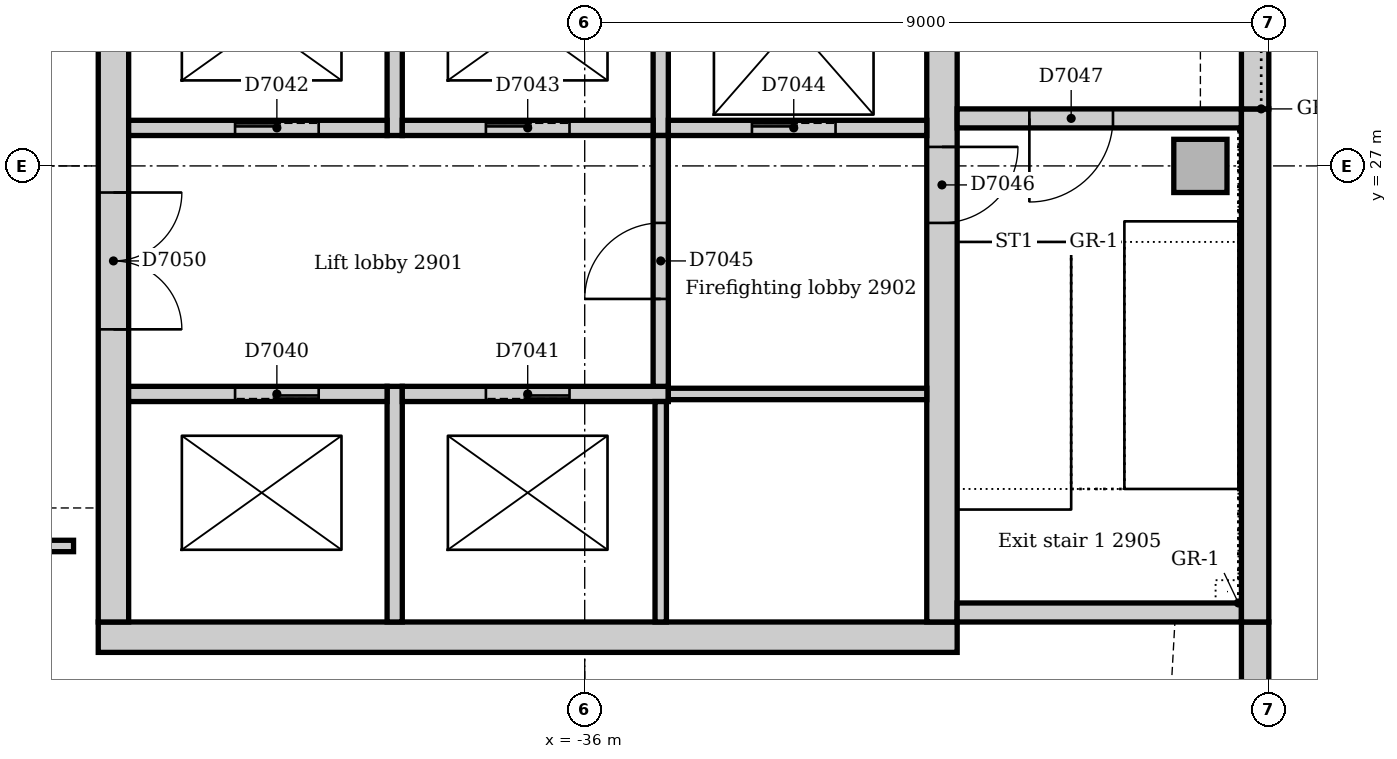
"""IFC4 building model, lengths in metres.
Left out: names, types, materials, properties, quantities, classifications, styles, units other than length and angle.
Written with IfcOpenShell. Run it as: python <this file> out.ifc"""

import sys

from ifc_helpers import new_model, si_unit, direction, frame, frame_2d, origin, origin_2d, place, context, subcontext, project, spatial, rectangle, extrude, element, fill, save


model = new_model("IFC4")
c1 = context("Model", 3, precision=1e-05, world=origin(), true_north=direction((0.0, 1.0)))
c2 = subcontext(c1, "Body", "Model", "MODEL_VIEW")
j1 = project(units=[si_unit("LENGTHUNIT", "METRE"), si_unit("PLANEANGLEUNIT", "RADIAN")], contexts=[c1])
p1 = place(None, origin())
s1 = spatial("IfcSite", under=j1, at=p1, CompositionType="ELEMENT")
p2 = place(p1, origin())
s2 = spatial("IfcBuilding", under=s1, at=p2, CompositionType="ELEMENT")
p3 = place(p2, frame((0.0, 0.0, 124.0)))
s3 = spatial("IfcBuildingStorey", under=s2, at=p3, CompositionType="ELEMENT", Elevation=124.0)
p4 = place(p3, frame((-42.4, 20.8, 0.0), z_axis=(0.0, 0.0, 1.0), x_axis=(1.0, 0.0, 0.0)))
e1 = element("IfcWall", 1, at=p4, inside=s3, PredefinedType="SOLIDWALL", context=c2, shape_type="SweptSolid", body=[
    extrude(rectangle(XDim=11.3, YDim=0.4, at=frame_2d((5.65, 0.0))), origin(), (0.0, 0.0, 1.0), 4.0),
])
p5 = place(p3, frame((-31.3, 21.0, 0.0), z_axis=(0.0, 0.0, 1.0), x_axis=(0.0, 1.0, 0.0)))
e2 = element("IfcWall", 2, at=p5, inside=s3, PredefinedType="SOLIDWALL", context=c2, shape_type="SweptSolid", body=[
    extrude(rectangle(XDim=9.5, YDim=0.4, at=frame_2d((4.75, 0.0))), origin(), (0.0, 0.0, 1.0), 4.0),
])
p6 = place(p5, frame((5.25, 0.0, 0.0)))
e3 = element("IfcOpeningElement", 3, at=p6, cuts=e2, PredefinedType="OPENING", context=c2, shape_type="SweptSolid", body=[
    extrude(rectangle(XDim=1.0, YDim=2.1, at=frame_2d((0.5, 1.05))), frame((0.0, 0.21, 0.0), z_axis=(0.0, -1.0, 0.0), x_axis=(1.0, 0.0, 0.0)), (0.0, 0.0, 1.0), 0.42),
])
p7 = place(p3, frame((-42.2, 30.5, 0.0), z_axis=(0.0, 0.0, 1.0), x_axis=(0.0, -1.0, 0.0)))
e4 = element("IfcWall", 4, at=p7, inside=s3, PredefinedType="SOLIDWALL", context=c2, shape_type="SweptSolid", body=[
    extrude(rectangle(XDim=9.5, YDim=0.4, at=frame_2d((4.75, 0.0))), origin(), (0.0, 0.0, 1.0), 4.0),
])
p8 = place(p7, frame((3.85, 0.0, 0.0)))
e5 = element("IfcOpeningElement", 5, at=p8, cuts=e4, PredefinedType="OPENING", context=c2, shape_type="SweptSolid", body=[
    extrude(rectangle(XDim=1.8, YDim=2.1, at=frame_2d((0.9, 1.05))), frame((0.0, 0.21, 0.0), z_axis=(0.0, -1.0, 0.0), x_axis=(1.0, 0.0, 0.0)), (0.0, 0.0, 1.0), 0.42),
])
p9 = place(p3, frame((-31.1, 21.125, 0.0), z_axis=(0.0, 0.0, 1.0), x_axis=(1.0, 0.0, 0.0)))
e6 = element("IfcWall", 6, at=p9, inside=s3, PredefinedType="SOLIDWALL", context=c2, shape_type="SweptSolid", body=[
    extrude(rectangle(XDim=3.74, YDim=0.25, at=frame_2d((1.87, 0.0))), origin(), (0.0, 0.0, 1.0), 4.0),
])
p10 = place(p3, frame((-27.36, 27.625, 0.0), z_axis=(0.0, 0.0, 1.0), x_axis=(-1.0, 0.0, 0.0)))
e7 = element("IfcWall", 7, at=p10, inside=s3, PredefinedType="SOLIDWALL", context=c2, shape_type="SweptSolid", body=[
    extrude(rectangle(XDim=3.74, YDim=0.25, at=frame_2d((1.87, 0.0))), origin(), (0.0, 0.0, 1.0), 4.0),
])
p11 = place(p10, frame((1.69, 0.0, 0.0)))
e8 = element("IfcOpeningElement", 8, at=p11, cuts=e7, PredefinedType="OPENING", context=c2, shape_type="SweptSolid", body=[
    extrude(rectangle(XDim=1.1, YDim=2.1, at=frame_2d((0.55, 1.05))), frame((0.0, 0.135, 0.0), z_axis=(0.0, -1.0, 0.0), x_axis=(1.0, 0.0, 0.0)), (0.0, 0.0, 1.0), 0.27),
])
p12 = place(p3, frame((-27.9, 27.0, 0.0), z_axis=(0.0, 0.0, 1.0), x_axis=(1.0, 0.0, 0.0)))
e9 = element("IfcColumn", 9, at=p12, inside=s3, PredefinedType="COLUMN", context=c2, shape_type="SweptSolid", body=[
    extrude(rectangle(XDim=0.7, YDim=0.7, at=origin_2d()), origin(), (0.0, 0.0, 1.0), 4.0),
])
p13 = place(p3, frame((-27.18, 17.743, 0.0), z_axis=(0.0, 0.0, 1.0), x_axis=(0.0, 1.0, 0.0)))
e10 = element("IfcWall", 10, at=p13, inside=s3, PredefinedType="STANDARD", context=c2, shape_type="SweptSolid", body=[
    extrude(rectangle(XDim=3.257, YDim=0.36, at=frame_2d((1.629, 0.0))), origin(), (0.0, 0.0, 1.0), 3.85),
])
p14 = place(p3, frame((-27.18, 21.0, 0.0), z_axis=(0.0, 0.0, 1.0), x_axis=(0.0, 1.0, 0.0)))
e11 = element("IfcWall", 11, at=p14, inside=s3, PredefinedType="STANDARD", context=c2, shape_type="SweptSolid", body=[
    extrude(rectangle(XDim=6.75, YDim=0.36, at=frame_2d((3.375, 0.0))), origin(), (0.0, 0.0, 1.0), 3.85),
])
p15 = place(p3, frame((-27.18, 27.75, 0.0), z_axis=(0.0, 0.0, 1.0), x_axis=(0.0, 1.0, 0.0)))
e12 = element("IfcWall", 12, at=p15, inside=s3, PredefinedType="STANDARD", context=c2, shape_type="SweptSolid", body=[
    extrude(rectangle(XDim=7.5, YDim=0.36, at=frame_2d((3.75, 0.0))), origin(), (0.0, 0.0, 1.0), 3.85),
])
p16 = place(p15, frame((2.85, 0.0, 1.2)))
e13 = element("IfcOpeningElement", 13, at=p16, cuts=e12, PredefinedType="OPENING", context=c2, shape_type="SweptSolid", body=[
    extrude(rectangle(XDim=1.8, YDim=1.2, at=frame_2d((0.9, 0.6))), frame((0.0, 0.19, 0.0), z_axis=(0.0, -1.0, 0.0), x_axis=(1.0, 0.0, 0.0)), (0.0, 0.0, 1.0), 0.38),
])
p17 = place(p3, frame((-38.5, 21.0, 0.0), z_axis=(0.0, 0.0, 1.0), x_axis=(0.0, 1.0, 0.0)))
e14 = element("IfcWall", 14, at=p17, inside=s3, PredefinedType="SOLIDWALL", context=c2, shape_type="SweptSolid", body=[
    extrude(rectangle(XDim=3.1, YDim=0.2, at=frame_2d((1.55, 0.0))), origin(), (0.0, 0.0, 1.0), 4.0),
])
p18 = place(p3, frame((-38.6, 24.0, 0.0), z_axis=(0.0, 0.0, 1.0), x_axis=(-1.0, 0.0, 0.0)))
e15 = element("IfcWall", 15, at=p18, inside=s3, PredefinedType="SOLIDWALL", context=c2, shape_type="SweptSolid", body=[
    extrude(rectangle(XDim=3.4, YDim=0.2, at=frame_2d((1.7, 0.0))), origin(), (0.0, 0.0, 1.0), 4.0),
])
p19 = place(p18, frame((0.9, 0.0, 0.0)))
e16 = element("IfcOpeningElement", 16, at=p19, cuts=e15, PredefinedType="OPENING", context=c2, shape_type="SweptSolid", body=[
    extrude(rectangle(XDim=1.1, YDim=2.1, at=frame_2d((0.55, 1.05))), frame((0.0, 0.11, 0.0), z_axis=(0.0, -1.0, 0.0), x_axis=(1.0, 0.0, 0.0)), (0.0, 0.0, 1.0), 0.22),
])
p20 = place(p3, frame((-34.9, 24.0, 0.0), z_axis=(0.0, 0.0, 1.0), x_axis=(-1.0, 0.0, 0.0)))
e17 = element("IfcWall", 17, at=p20, inside=s3, PredefinedType="SOLIDWALL", context=c2, shape_type="SweptSolid", body=[
    extrude(rectangle(XDim=3.5, YDim=0.2, at=frame_2d((1.75, 0.0))), origin(), (0.0, 0.0, 1.0), 4.0),
])
p21 = place(p20, frame((1.3, 0.0, 0.0)))
e18 = element("IfcOpeningElement", 18, at=p21, cuts=e17, PredefinedType="OPENING", context=c2, shape_type="SweptSolid", body=[
    extrude(rectangle(XDim=1.1, YDim=2.1, at=frame_2d((0.55, 1.05))), frame((0.0, 0.11, 0.0), z_axis=(0.0, -1.0, 0.0), x_axis=(1.0, 0.0, 0.0)), (0.0, 0.0, 1.0), 0.22),
])
p22 = place(p3, frame((-38.5, 27.4, 0.0), z_axis=(0.0, 0.0, 1.0), x_axis=(0.0, 1.0, 0.0)))
e19 = element("IfcWall", 19, at=p22, inside=s3, PredefinedType="SOLIDWALL", context=c2, shape_type="SweptSolid", body=[
    extrude(rectangle(XDim=2.85, YDim=0.2, at=frame_2d((1.425, 0.0))), origin(), (0.0, 0.0, 1.0), 4.0),
])
p23 = place(p3, frame((-42.0, 27.5, 0.0), z_axis=(0.0, 0.0, 1.0), x_axis=(1.0, 0.0, 0.0)))
e20 = element("IfcWall", 20, at=p23, inside=s3, PredefinedType="SOLIDWALL", context=c2, shape_type="SweptSolid", body=[
    extrude(rectangle(XDim=3.4, YDim=0.2, at=frame_2d((1.7, 0.0))), origin(), (0.0, 0.0, 1.0), 4.0),
])
p24 = place(p23, frame((1.4, 0.0, 0.0)))
e21 = element("IfcOpeningElement", 21, at=p24, cuts=e20, PredefinedType="OPENING", context=c2, shape_type="SweptSolid", body=[
    extrude(rectangle(XDim=1.1, YDim=2.1, at=frame_2d((0.55, 1.05))), frame((0.0, 0.11, 0.0), z_axis=(0.0, -1.0, 0.0), x_axis=(1.0, 0.0, 0.0)), (0.0, 0.0, 1.0), 0.22),
])
p25 = place(p3, frame((-35.0, 27.4, 0.0), z_axis=(0.0, 0.0, 1.0), x_axis=(0.0, 1.0, 0.0)))
e22 = element("IfcWall", 22, at=p25, inside=s3, PredefinedType="SOLIDWALL", context=c2, shape_type="SweptSolid", body=[
    extrude(rectangle(XDim=2.85, YDim=0.2, at=frame_2d((1.425, 0.0))), origin(), (0.0, 0.0, 1.0), 4.0),
])
p26 = place(p3, frame((-38.4, 27.5, 0.0), z_axis=(0.0, 0.0, 1.0), x_axis=(1.0, 0.0, 0.0)))
e23 = element("IfcWall", 23, at=p26, inside=s3, PredefinedType="SOLIDWALL", context=c2, shape_type="SweptSolid", body=[
    extrude(rectangle(XDim=3.3, YDim=0.2, at=frame_2d((1.65, 0.0))), origin(), (0.0, 0.0, 1.0), 4.0),
])
p27 = place(p26, frame((1.1, 0.0, 0.0)))
e24 = element("IfcOpeningElement", 24, at=p27, cuts=e23, PredefinedType="OPENING", context=c2, shape_type="SweptSolid", body=[
    extrude(rectangle(XDim=1.1, YDim=2.1, at=frame_2d((0.55, 1.05))), frame((0.0, 0.11, 0.0), z_axis=(0.0, -1.0, 0.0), x_axis=(1.0, 0.0, 0.0)), (0.0, 0.0, 1.0), 0.22),
])
p28 = place(p3, frame((-34.9, 27.5, 0.0), z_axis=(0.0, 0.0, 1.0), x_axis=(1.0, 0.0, 0.0)))
e25 = element("IfcWall", 25, at=p28, inside=s3, PredefinedType="SOLIDWALL", context=c2, shape_type="SweptSolid", body=[
    extrude(rectangle(XDim=3.4, YDim=0.2, at=frame_2d((1.7, 0.0))), origin(), (0.0, 0.0, 1.0), 4.0),
])
p29 = place(p28, frame((1.1, 0.0, 0.0)))
e26 = element("IfcOpeningElement", 26, at=p29, cuts=e25, PredefinedType="OPENING", context=c2, shape_type="SweptSolid", body=[
    extrude(rectangle(XDim=1.1, YDim=2.1, at=frame_2d((0.55, 1.05))), frame((0.0, 0.11, 0.0), z_axis=(0.0, -1.0, 0.0), x_axis=(1.0, 0.0, 0.0)), (0.0, 0.0, 1.0), 0.22),
])
p30 = place(p3, frame((-35.0, 24.1, 0.0), z_axis=(0.0, 0.0, 1.0), x_axis=(0.0, 1.0, 0.0)))
e27 = element("IfcWall", 27, at=p30, inside=s3, PredefinedType="SOLIDWALL", context=c2, shape_type="SweptSolid", body=[
    extrude(rectangle(XDim=3.3, YDim=0.2, at=frame_2d((1.65, 0.0))), origin(), (0.0, 0.0, 1.0), 4.0),
])
p31 = place(p30, frame((1.15, 0.0, 0.0)))
e28 = element("IfcOpeningElement", 28, at=p31, cuts=e27, PredefinedType="OPENING", context=c2, shape_type="SweptSolid", body=[
    extrude(rectangle(XDim=1.0, YDim=2.1, at=frame_2d((0.5, 1.05))), frame((0.0, 0.11, 0.0), z_axis=(0.0, -1.0, 0.0), x_axis=(1.0, 0.0, 0.0)), (0.0, 0.0, 1.0), 0.22),
])
p32 = place(p3, frame((-35.0, 21.0, 0.0), z_axis=(0.0, 0.0, 1.0), x_axis=(0.0, 1.0, 0.0)))
e29 = element("IfcWall", 29, at=p32, inside=s3, PredefinedType="SOLIDWALL", context=c2, shape_type="SweptSolid", body=[
    extrude(rectangle(XDim=2.9, YDim=0.15, at=frame_2d((1.45, 0.0))), origin(), (0.0, 0.0, 1.0), 4.0),
])
p33 = place(p3, frame((-31.5, 24.0, 0.0), z_axis=(0.0, 0.0, 1.0), x_axis=(-1.0, 0.0, 0.0)))
e30 = element("IfcWall", 30, at=p33, inside=s3, PredefinedType="SOLIDWALL", context=c2, shape_type="SweptSolid", body=[
    extrude(rectangle(XDim=3.4, YDim=0.15, at=frame_2d((1.7, 0.0))), origin(), (0.0, 0.0, 1.0), 4.0),
])
p34 = place(p3, frame((-59.766, 22.0, 0.0), z_axis=(0.0, 0.0, 1.0), x_axis=(1.0, 0.0, 0.0)))
e31 = element("IfcWall", 31, at=p34, inside=s3, PredefinedType="PARTITIONING", context=c2, shape_type="SweptSolid", body=[
    extrude(rectangle(XDim=17.041, YDim=0.15, at=frame_2d((8.52, 0.0))), origin(), (0.0, 0.0, 1.0), 3.85),
])
p35 = place(p34, frame((15.366, 0.0, 0.0)))
e32 = element("IfcOpeningElement", 32, at=p35, cuts=e31, PredefinedType="OPENING", context=c2, shape_type="SweptSolid", body=[
    extrude(rectangle(XDim=0.9, YDim=2.1, at=frame_2d((0.45, 1.05))), frame((0.0, 0.085, 0.0), z_axis=(0.0, -1.0, 0.0), x_axis=(1.0, 0.0, 0.0)), (0.0, 0.0, 1.0), 0.17),
])
p36 = place(p34, frame((2.5, 0.0, 0.0)))
e33 = element("IfcOpeningElement", 33, at=p36, cuts=e31, PredefinedType="OPENING", context=c2, shape_type="SweptSolid", body=[
    extrude(rectangle(XDim=0.9, YDim=2.1, at=frame_2d((0.45, 1.05))), frame((0.0, 0.085, 0.0), z_axis=(0.0, -1.0, 0.0), x_axis=(1.0, 0.0, 0.0)), (0.0, 0.0, 1.0), 0.17),
])
p37 = place(p34, frame((9.056, 0.0, 0.0)))
e34 = element("IfcOpeningElement", 34, at=p37, cuts=e31, PredefinedType="OPENING", context=c2, shape_type="SweptSolid", body=[
    extrude(rectangle(XDim=1.0, YDim=2.1, at=frame_2d((0.5, 1.05))), frame((0.0, 0.085, 0.0), z_axis=(0.0, -1.0, 0.0), x_axis=(1.0, 0.0, 0.0)), (0.0, 0.0, 1.0), 0.17),
])
p38 = place(p19, origin())
e35 = element("IfcDoor", 35, at=p38, inside=s3, OperationType="SLIDING_TO_LEFT", PredefinedType="DOOR", context=c2, shape_type="SweptSolid", body=[
    extrude(rectangle(XDim=1.1, YDim=2.1, at=frame_2d((0.55, 1.05))), frame((0.0, 0.025, 0.0), z_axis=(0.0, -1.0, 0.0), x_axis=(1.0, 0.0, 0.0)), (0.0, 0.0, 1.0), 0.05),
])
fill(e16, e35)
p39 = place(p21, origin())
e36 = element("IfcDoor", 36, at=p39, inside=s3, OperationType="SLIDING_TO_LEFT", PredefinedType="DOOR", context=c2, shape_type="SweptSolid", body=[
    extrude(rectangle(XDim=1.1, YDim=2.1, at=frame_2d((0.55, 1.05))), frame((0.0, 0.025, 0.0), z_axis=(0.0, -1.0, 0.0), x_axis=(1.0, 0.0, 0.0)), (0.0, 0.0, 1.0), 0.05),
])
fill(e18, e36)
p40 = place(p24, origin())
e37 = element("IfcDoor", 37, at=p40, inside=s3, OperationType="SLIDING_TO_LEFT", PredefinedType="DOOR", context=c2, shape_type="SweptSolid", body=[
    extrude(rectangle(XDim=1.1, YDim=2.1, at=frame_2d((0.55, 1.05))), frame((0.0, 0.025, 0.0), z_axis=(0.0, -1.0, 0.0), x_axis=(1.0, 0.0, 0.0)), (0.0, 0.0, 1.0), 0.05),
])
fill(e21, e37)
p41 = place(p27, origin())
e38 = element("IfcDoor", 38, at=p41, inside=s3, OperationType="SLIDING_TO_LEFT", PredefinedType="DOOR", context=c2, shape_type="SweptSolid", body=[
    extrude(rectangle(XDim=1.1, YDim=2.1, at=frame_2d((0.55, 1.05))), frame((0.0, 0.025, 0.0), z_axis=(0.0, -1.0, 0.0), x_axis=(1.0, 0.0, 0.0)), (0.0, 0.0, 1.0), 0.05),
])
fill(e24, e38)
p42 = place(p29, origin())
e39 = element("IfcDoor", 39, at=p42, inside=s3, OperationType="SLIDING_TO_LEFT", PredefinedType="DOOR", context=c2, shape_type="SweptSolid", body=[
    extrude(rectangle(XDim=1.1, YDim=2.1, at=frame_2d((0.55, 1.05))), frame((0.0, 0.025, 0.0), z_axis=(0.0, -1.0, 0.0), x_axis=(1.0, 0.0, 0.0)), (0.0, 0.0, 1.0), 0.05),
])
fill(e26, e39)
p43 = place(p31, origin())
e40 = element("IfcDoor", 40, at=p43, inside=s3, OperationType="SINGLE_SWING_LEFT", PredefinedType="DOOR", context=c2, shape_type="SweptSolid", body=[
    extrude(rectangle(XDim=1.0, YDim=2.1, at=frame_2d((0.5, 1.05))), frame((0.0, 0.025, 0.0), z_axis=(0.0, -1.0, 0.0), x_axis=(1.0, 0.0, 0.0)), (0.0, 0.0, 1.0), 0.05),
])
fill(e28, e40)
p44 = place(p6, frame((1.0, 0.0, 0.0), z_axis=(0.0, 0.0, 1.0), x_axis=(-1.0, 0.0, 0.0)))
e41 = element("IfcDoor", 41, at=p44, inside=s3, OperationType="SINGLE_SWING_LEFT", PredefinedType="DOOR", context=c2, shape_type="SweptSolid", body=[
    extrude(rectangle(XDim=1.0, YDim=2.1, at=frame_2d((0.5, 1.05))), frame((0.0, 0.025, 0.0), z_axis=(0.0, -1.0, 0.0), x_axis=(1.0, 0.0, 0.0)), (0.0, 0.0, 1.0), 0.05),
])
fill(e3, e41)
p45 = place(p11, origin())
e42 = element("IfcDoor", 42, at=p45, inside=s3, OperationType="SINGLE_SWING_RIGHT", PredefinedType="DOOR", context=c2, shape_type="SweptSolid", body=[
    extrude(rectangle(XDim=1.1, YDim=2.1, at=frame_2d((0.55, 1.05))), frame((0.0, 0.025, 0.0), z_axis=(0.0, -1.0, 0.0), x_axis=(1.0, 0.0, 0.0)), (0.0, 0.0, 1.0), 0.05),
])
fill(e8, e42)
p46 = place(p8, origin())
e43 = element("IfcDoor", 43, at=p46, inside=s3, OperationType="DOUBLE_DOOR_SINGLE_SWING", PredefinedType="DOOR", context=c2, shape_type="SweptSolid", body=[
    extrude(rectangle(XDim=1.8, YDim=2.1, at=frame_2d((0.9, 1.05))), frame((0.0, 0.025, 0.0), z_axis=(0.0, -1.0, 0.0), x_axis=(1.0, 0.0, 0.0)), (0.0, 0.0, 1.0), 0.05),
])
fill(e5, e43)
save(model, sys.argv[1])
